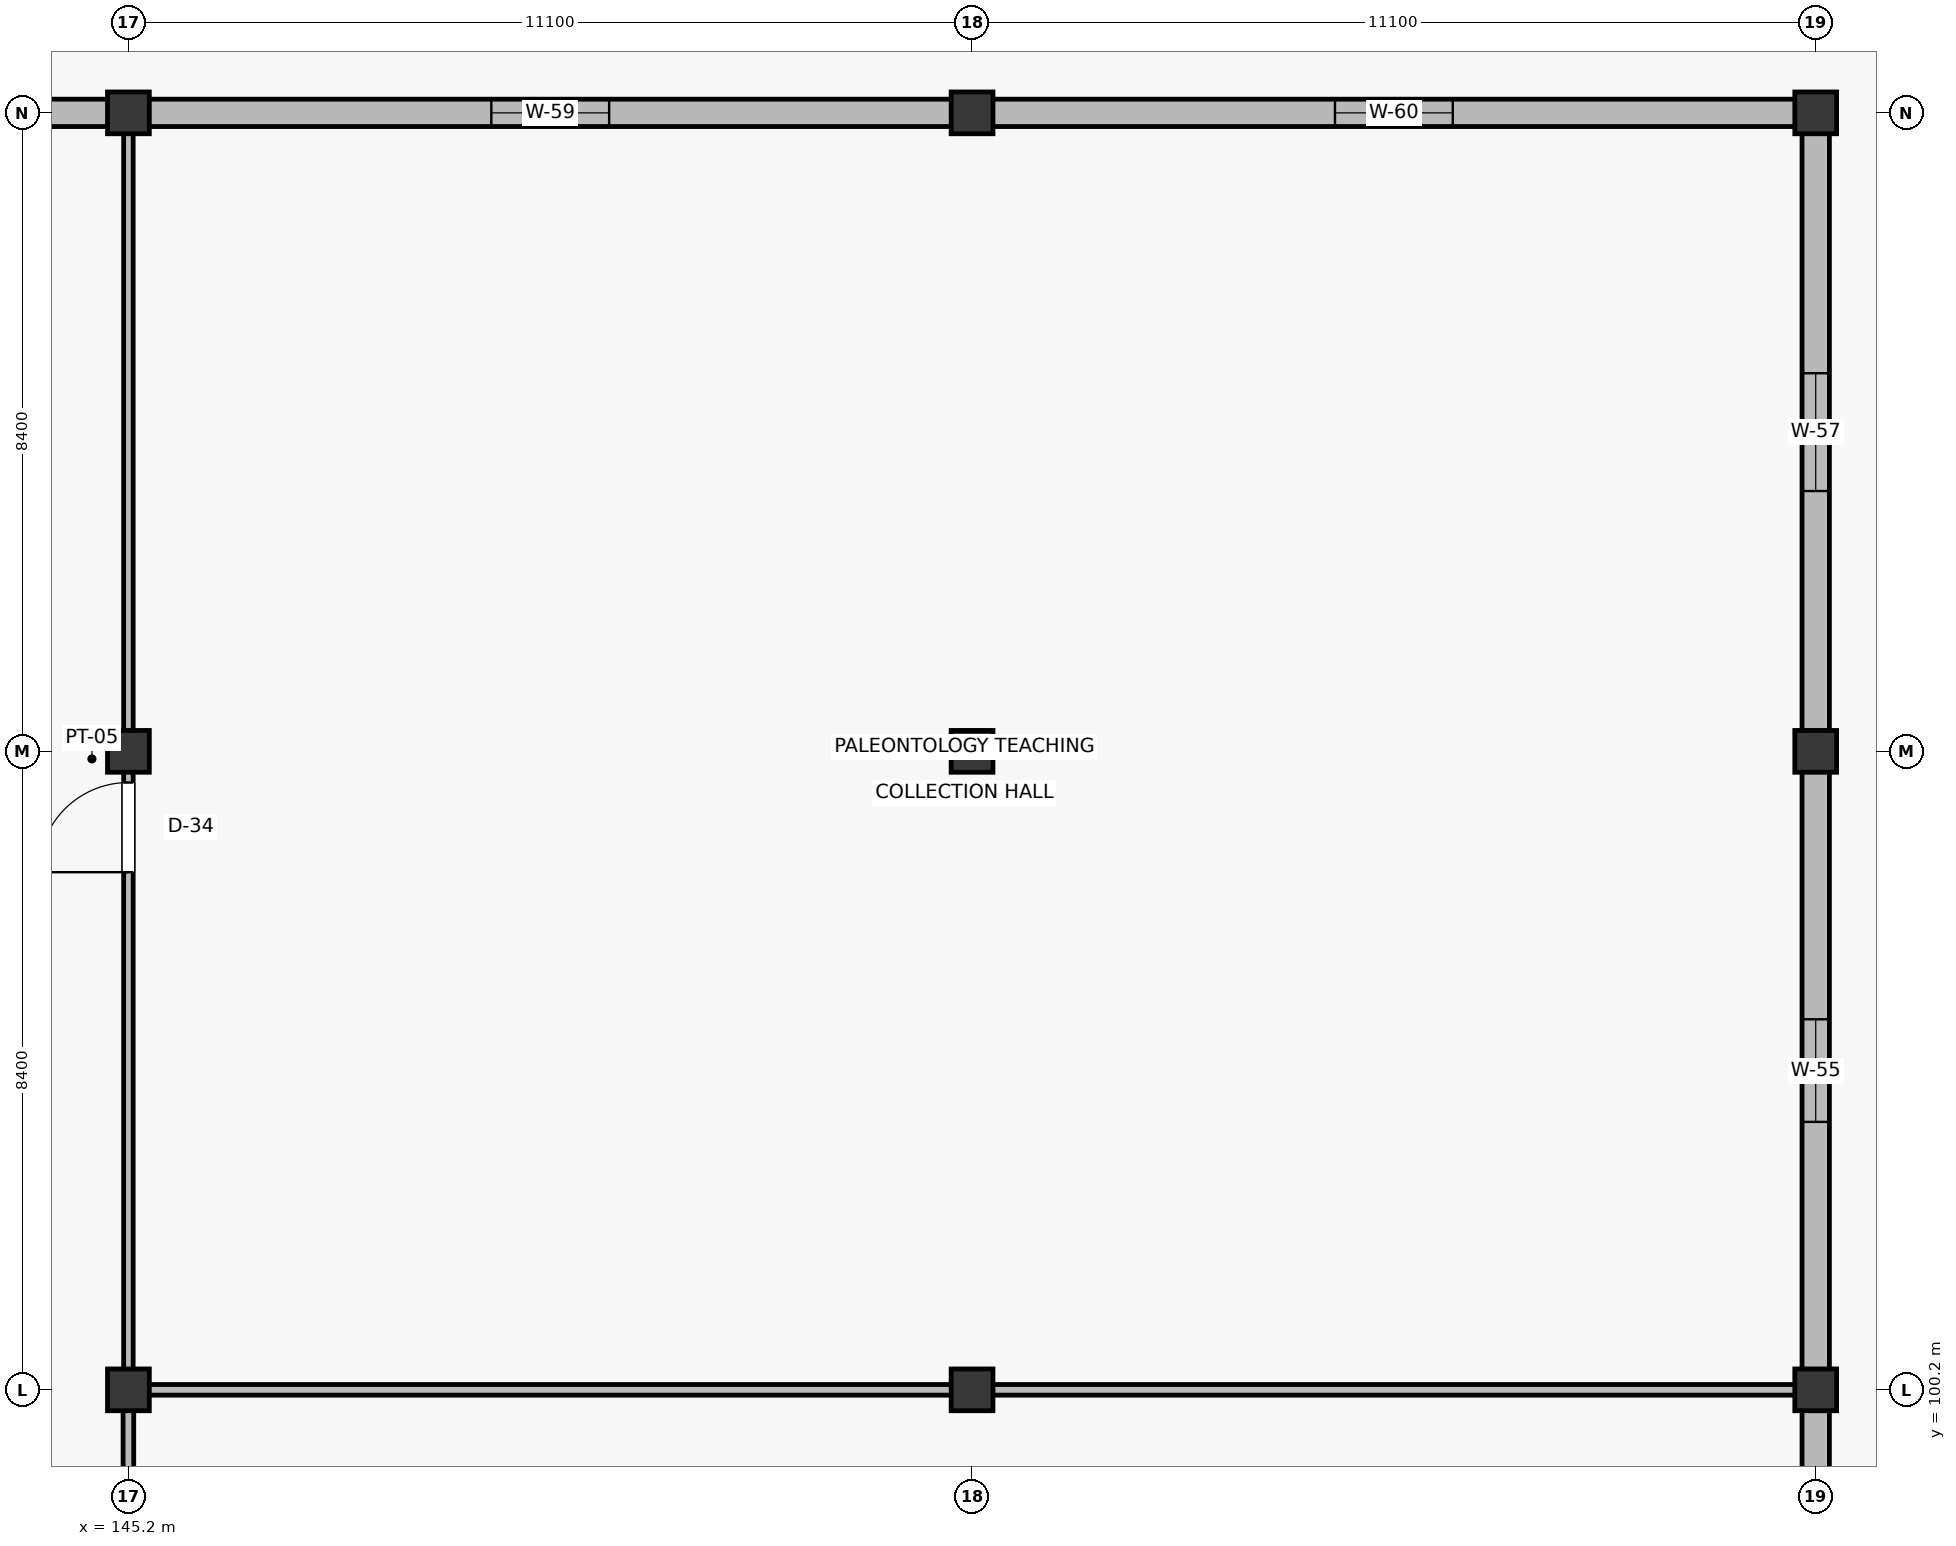
"""IFC4 building model, lengths in metres.
Left out: names, types, materials, properties, quantities, classifications, styles, units other than length and angle.
Written with IfcOpenShell. Run it as: python <this file> out.ifc"""

import sys

from ifc_helpers import new_model, si_unit, direction, frame, frame_2d, origin, origin_2d, place, context, subcontext, project, spatial, rectangle, extrude, element, fill, save


model = new_model("IFC4")
c1 = context("Model", 3, precision=1e-05, world=origin(), true_north=direction((0.0, 1.0)))
c2 = subcontext(c1, "Body", "Model", "MODEL_VIEW")
j1 = project(units=[si_unit("LENGTHUNIT", "METRE"), si_unit("PLANEANGLEUNIT", "RADIAN")], contexts=[c1])
p1 = place(None, origin())
s1 = spatial("IfcSite", under=j1, at=p1, CompositionType="ELEMENT")
p2 = place(p1, origin())
s2 = spatial("IfcBuilding", under=s1, at=p2, CompositionType="ELEMENT")
p3 = place(p2, origin())
s3 = spatial("IfcBuildingStorey", under=s2, at=p3, CompositionType="ELEMENT", Elevation=0.0)
for number, where, z_axis, x_axis in (
    (1, (145.2, 100.2, 0.0), (0.0, 0.0, 1.0), (1.0, 0.0, 0.0)),
    (2, (145.2, 108.6, 0.0), (0.0, 0.0, 1.0), (1.0, 0.0, 0.0)),
    (3, (145.2, 117.0, 0.0), (0.0, 0.0, 1.0), (1.0, 0.0, 0.0)),
    (4, (156.3, 100.2, 0.0), (0.0, 0.0, 1.0), (1.0, 0.0, 0.0)),
    (5, (156.3, 108.6, 0.0), (0.0, 0.0, 1.0), (1.0, 0.0, 0.0)),
    (6, (156.3, 117.0, 0.0), (0.0, 0.0, 1.0), (1.0, 0.0, 0.0)),
    (7, (167.4, 100.2, 0.0), (0.0, 0.0, 1.0), (1.0, 0.0, 0.0)),
    (8, (167.4, 108.6, 0.0), (0.0, 0.0, 1.0), (1.0, 0.0, 0.0)),
    (9, (167.4, 117.0, 0.0), (0.0, 0.0, 1.0), (1.0, 0.0, 0.0)),
):
    element("IfcColumn", number, at=place(p3, frame(where, z_axis=z_axis, x_axis=x_axis)), inside=s3, PredefinedType="COLUMN", context=c2, shape_type="SweptSolid", body=[
        extrude(rectangle(XDim=0.55, YDim=0.55, at=origin_2d()), origin(), (0.0, 0.0, 1.0), 5.4),
    ])
p4 = place(p3, frame((167.4, 92.055, 0.0), z_axis=(0.0, 0.0, 1.0), x_axis=(0.0, 1.0, 0.0)))
e10 = element("IfcWall", 10, at=p4, inside=s3, PredefinedType="SOLIDWALL", context=c2, shape_type="SweptSolid", body=[
    extrude(rectangle(XDim=7.89, YDim=0.36, at=frame_2d((3.945, 0.0))), origin(), (0.0, 0.0, 1.0), 4.445),
])
p5 = place(p4, frame((3.27, 0.0, 0.85)))
e11 = element("IfcOpeningElement", 11, at=p5, cuts=e10, PredefinedType="OPENING", context=c2, shape_type="SweptSolid", body=[
    extrude(rectangle(XDim=1.35, YDim=1.15, at=frame_2d((0.675, 0.575))), frame((0.0, 0.19, 0.0), z_axis=(0.0, -1.0, 0.0), x_axis=(1.0, 0.0, 0.0)), (0.0, 0.0, 1.0), 0.38),
])
p6 = place(p3, frame((167.4, 100.465, 0.0), z_axis=(0.0, 0.0, 1.0), x_axis=(0.0, 1.0, 0.0)))
e12 = element("IfcWall", 12, at=p6, inside=s3, PredefinedType="SOLIDWALL", context=c2, shape_type="SweptSolid", body=[
    extrude(rectangle(XDim=7.87, YDim=0.36, at=frame_2d((3.935, 0.0))), origin(), (0.0, 0.0, 1.0), 4.445),
])
p7 = place(p6, frame((3.26, 0.0, 0.85)))
e13 = element("IfcOpeningElement", 13, at=p7, cuts=e12, PredefinedType="OPENING", context=c2, shape_type="SweptSolid", body=[
    extrude(rectangle(XDim=1.35, YDim=1.55, at=frame_2d((0.675, 0.775))), frame((0.0, 0.19, 0.0), z_axis=(0.0, -1.0, 0.0), x_axis=(1.0, 0.0, 0.0)), (0.0, 0.0, 1.0), 0.38),
])
p8 = place(p3, frame((167.4, 108.855, 0.0), z_axis=(0.0, 0.0, 1.0), x_axis=(0.0, 1.0, 0.0)))
e14 = element("IfcWall", 14, at=p8, inside=s3, PredefinedType="SOLIDWALL", context=c2, shape_type="SweptSolid", body=[
    extrude(rectangle(XDim=7.89, YDim=0.36, at=frame_2d((3.945, 0.0))), origin(), (0.0, 0.0, 1.0), 4.445),
])
p9 = place(p8, frame((3.17, 0.0, 0.85)))
e15 = element("IfcOpeningElement", 15, at=p9, cuts=e14, PredefinedType="OPENING", context=c2, shape_type="SweptSolid", body=[
    extrude(rectangle(XDim=1.55, YDim=1.15, at=frame_2d((0.775, 0.575))), frame((0.0, 0.19, 0.0), z_axis=(0.0, -1.0, 0.0), x_axis=(1.0, 0.0, 0.0)), (0.0, 0.0, 1.0), 0.38),
])
p10 = place(p3, frame((134.065, 117.0, 0.0), z_axis=(0.0, 0.0, 1.0), x_axis=(1.0, 0.0, 0.0)))
e16 = element("IfcWall", 16, at=p10, inside=s3, PredefinedType="SOLIDWALL", context=c2, shape_type="SweptSolid", body=[
    extrude(rectangle(XDim=10.87, YDim=0.36, at=frame_2d((5.435, 0.0))), origin(), (0.0, 0.0, 1.0), 4.445),
])
p11 = place(p10, frame((4.66, 0.0, 0.85)))
e17 = element("IfcOpeningElement", 17, at=p11, cuts=e16, PredefinedType="OPENING", context=c2, shape_type="SweptSolid", body=[
    extrude(rectangle(XDim=1.55, YDim=1.35, at=frame_2d((0.775, 0.675))), frame((0.0, 0.19, 0.0), z_axis=(0.0, -1.0, 0.0), x_axis=(1.0, 0.0, 0.0)), (0.0, 0.0, 1.0), 0.38),
])
p12 = place(p3, frame((145.465, 117.0, 0.0), z_axis=(0.0, 0.0, 1.0), x_axis=(1.0, 0.0, 0.0)))
e18 = element("IfcWall", 18, at=p12, inside=s3, PredefinedType="SOLIDWALL", context=c2, shape_type="SweptSolid", body=[
    extrude(rectangle(XDim=10.57, YDim=0.36, at=frame_2d((5.285, 0.0))), origin(), (0.0, 0.0, 1.0), 4.445),
])
p13 = place(p12, frame((4.51, 0.0, 0.85)))
e19 = element("IfcOpeningElement", 19, at=p13, cuts=e18, PredefinedType="OPENING", context=c2, shape_type="SweptSolid", body=[
    extrude(rectangle(XDim=1.55, YDim=1.55, at=frame_2d((0.775, 0.775))), frame((0.0, 0.19, 0.0), z_axis=(0.0, -1.0, 0.0), x_axis=(1.0, 0.0, 0.0)), (0.0, 0.0, 1.0), 0.38),
])
p14 = place(p3, frame((156.565, 117.0, 0.0), z_axis=(0.0, 0.0, 1.0), x_axis=(1.0, 0.0, 0.0)))
e20 = element("IfcWall", 20, at=p14, inside=s3, PredefinedType="SOLIDWALL", context=c2, shape_type="SweptSolid", body=[
    extrude(rectangle(XDim=10.57, YDim=0.36, at=frame_2d((5.285, 0.0))), origin(), (0.0, 0.0, 1.0), 4.445),
])
p15 = place(p14, frame((4.51, 0.0, 0.85)))
e21 = element("IfcOpeningElement", 21, at=p15, cuts=e20, PredefinedType="OPENING", context=c2, shape_type="SweptSolid", body=[
    extrude(rectangle(XDim=1.55, YDim=1.75, at=frame_2d((0.775, 0.875))), frame((0.0, 0.19, 0.0), z_axis=(0.0, -1.0, 0.0), x_axis=(1.0, 0.0, 0.0)), (0.0, 0.0, 1.0), 0.38),
])
p16 = place(p3, frame((145.2, 76.23, 0.0), z_axis=(0.0, 0.0, 1.0), x_axis=(0.0, 1.0, 0.0)))
e22 = element("IfcWall", 22, at=p16, inside=s3, PredefinedType="PARTITIONING", context=c2, shape_type="SweptSolid", body=[
    extrude(rectangle(XDim=23.94, YDim=0.14, at=frame_2d((11.97, 0.0))), origin(), (0.0, 0.0, 1.0), 4.495),
])
p17 = place(p16, frame((11.395, 0.0, 0.0)))
e23 = element("IfcOpeningElement", 23, at=p17, cuts=e22, PredefinedType="OPENING", context=c2, shape_type="SweptSolid", body=[
    extrude(rectangle(XDim=1.15, YDim=2.15, at=frame_2d((0.575, 1.075))), frame((0.0, 0.08, 0.0), z_axis=(0.0, -1.0, 0.0), x_axis=(1.0, 0.0, 0.0)), (0.0, 0.0, 1.0), 0.16),
])
p18 = place(p3, frame((145.2, 100.23, 0.0), z_axis=(0.0, 0.0, 1.0), x_axis=(0.0, 1.0, 0.0)))
e24 = element("IfcWall", 24, at=p18, inside=s3, PredefinedType="PARTITIONING", context=c2, shape_type="SweptSolid", body=[
    extrude(rectangle(XDim=16.54, YDim=0.125, at=frame_2d((8.27, 0.0))), origin(), (0.0, 0.0, 1.0), 4.495),
])
p19 = place(p18, frame((6.78, 0.0, 0.0)))
e25 = element("IfcOpeningElement", 25, at=p19, cuts=e24, PredefinedType="OPENING", context=c2, shape_type="SweptSolid", body=[
    extrude(rectangle(XDim=1.18, YDim=2.2, at=frame_2d((0.59, 1.1))), frame((0.0, 0.073, 0.0), z_axis=(0.0, -1.0, 0.0), x_axis=(1.0, 0.0, 0.0)), (0.0, 0.0, 1.0), 0.145),
])
p20 = place(p3, frame((145.23, 100.2, 0.0), z_axis=(0.0, 0.0, 1.0), x_axis=(1.0, 0.0, 0.0)))
e26 = element("IfcWall", 26, at=p20, inside=s3, PredefinedType="PARTITIONING", context=c2, shape_type="SweptSolid", body=[
    extrude(rectangle(XDim=21.94, YDim=0.14, at=frame_2d((10.97, 0.0))), origin(), (0.0, 0.0, 1.0), 4.125),
])
p21 = place(p7, frame((1.35, 0.0, 0.0), z_axis=(0.0, 0.0, 1.0), x_axis=(-1.0, 0.0, 0.0)))
e27 = element("IfcWindow", 27, at=p21, inside=s3, PartitioningType="DOUBLE_PANEL_VERTICAL", PredefinedType="WINDOW", context=c2, shape_type="SweptSolid", body=[
    extrude(rectangle(XDim=1.35, YDim=1.55, at=frame_2d((0.675, 0.775))), frame((0.0, 0.03, 0.0), z_axis=(0.0, -1.0, 0.0), x_axis=(1.0, 0.0, 0.0)), (0.0, 0.0, 1.0), 0.06),
])
fill(e13, e27)
p22 = place(p9, frame((1.55, 0.0, 0.0), z_axis=(0.0, 0.0, 1.0), x_axis=(-1.0, 0.0, 0.0)))
e28 = element("IfcWindow", 28, at=p22, inside=s3, PartitioningType="DOUBLE_PANEL_VERTICAL", PredefinedType="WINDOW", context=c2, shape_type="SweptSolid", body=[
    extrude(rectangle(XDim=1.55, YDim=1.15, at=frame_2d((0.775, 0.575))), frame((0.0, 0.03, 0.0), z_axis=(0.0, -1.0, 0.0), x_axis=(1.0, 0.0, 0.0)), (0.0, 0.0, 1.0), 0.06),
])
fill(e15, e28)
p23 = place(p13, origin())
e29 = element("IfcWindow", 29, at=p23, inside=s3, PartitioningType="DOUBLE_PANEL_VERTICAL", PredefinedType="WINDOW", context=c2, shape_type="SweptSolid", body=[
    extrude(rectangle(XDim=1.55, YDim=1.55, at=frame_2d((0.775, 0.775))), frame((0.0, 0.03, 0.0), z_axis=(0.0, -1.0, 0.0), x_axis=(1.0, 0.0, 0.0)), (0.0, 0.0, 1.0), 0.06),
])
fill(e19, e29)
p24 = place(p15, origin())
e30 = element("IfcWindow", 30, at=p24, inside=s3, PartitioningType="DOUBLE_PANEL_VERTICAL", PredefinedType="WINDOW", context=c2, shape_type="SweptSolid", body=[
    extrude(rectangle(XDim=1.55, YDim=1.75, at=frame_2d((0.775, 0.875))), frame((0.0, 0.03, 0.0), z_axis=(0.0, -1.0, 0.0), x_axis=(1.0, 0.0, 0.0)), (0.0, 0.0, 1.0), 0.06),
])
fill(e21, e30)
p25 = place(p19, origin())
e31 = element("IfcDoor", 31, at=p25, inside=s3, OperationType="SINGLE_SWING_LEFT", PredefinedType="DOOR", context=c2, shape_type="SweptSolid", body=[
    extrude(rectangle(XDim=1.18, YDim=2.2, at=frame_2d((0.59, 1.1))), frame((0.0, 0.025, 0.0), z_axis=(0.0, -1.0, 0.0), x_axis=(1.0, 0.0, 0.0)), (0.0, 0.0, 1.0), 0.05),
])
fill(e25, e31)
save(model, sys.argv[1])
